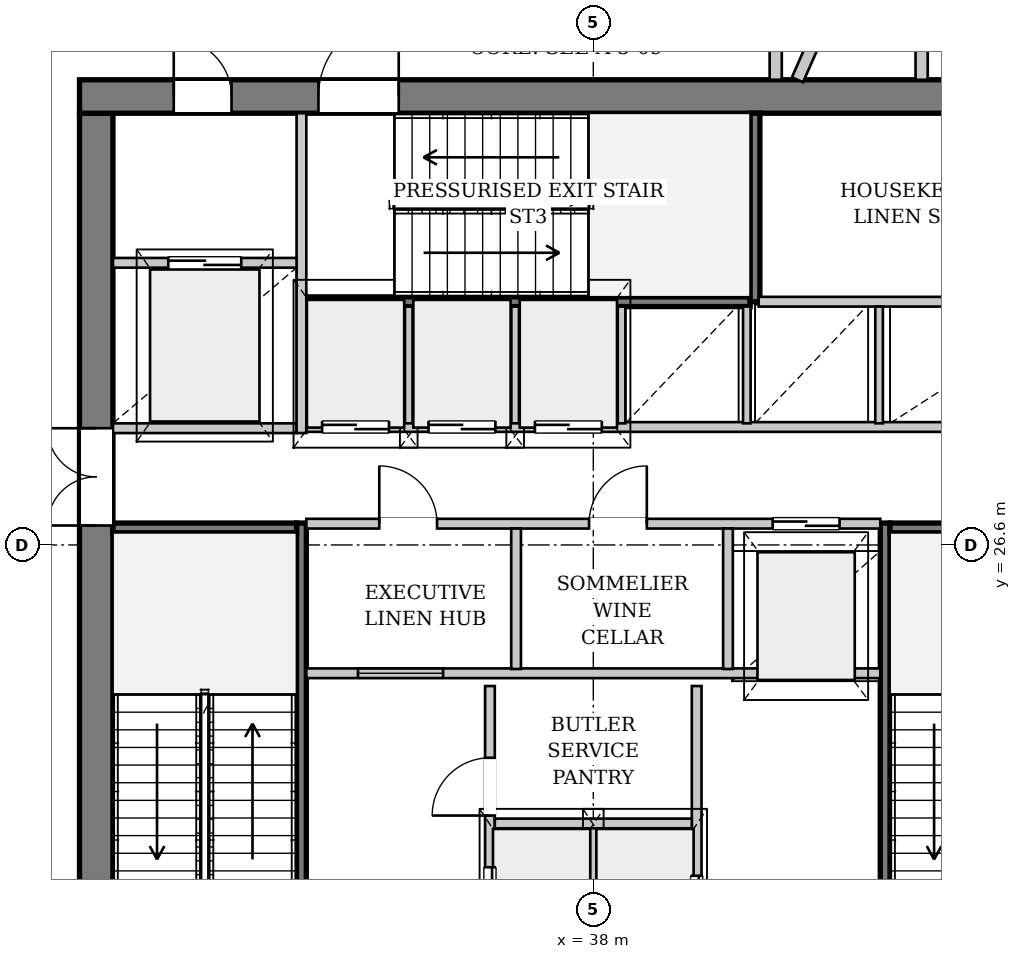
"""IFC4 building model, lengths in metres.
Left out: names, types, materials, properties, quantities, classifications, styles, units other than length and angle.
Written with IfcOpenShell. Run it as: python <this file> out.ifc"""

import sys

from ifc_helpers import new_model, si_unit, direction, frame, frame_2d, origin, place, context, subcontext, project, spatial, rectangle, extrude, source, transform, mapped, element, fill, save


model = new_model("IFC4")
c1 = context("Model", 3, precision=1e-05, world=origin(), true_north=direction((0.0, 1.0)))
c2 = subcontext(c1, "Body", "Model", "MODEL_VIEW")
j1 = project(units=[si_unit("LENGTHUNIT", "METRE"), si_unit("PLANEANGLEUNIT", "RADIAN")], contexts=[c1])
p1 = place(None, origin())
s1 = spatial("IfcSite", under=j1, at=p1, CompositionType="ELEMENT")
p2 = place(p1, origin())
s2 = spatial("IfcBuilding", under=s1, at=p2, CompositionType="ELEMENT")
p3 = place(p2, frame((0.0, 0.0, 196.3)))
s3 = spatial("IfcBuildingStorey", under=s2, at=p3, CompositionType="ELEMENT", Elevation=196.3)
p4 = place(p3, frame((16.053, 33.802, 0.0), z_axis=(0.0, 0.0, 1.0), x_axis=(0.923180319116, 0.384367140111, 0.0)))
e1 = element("IfcWall", 1, at=p4, inside=s3, PredefinedType="SOLIDWALL", context=c2, shape_type="SweptSolid", body=[
    extrude(rectangle(XDim=22.627, YDim=0.38, at=frame_2d((11.313, 0.0))), origin(), (0.0, 0.0, 1.0), 3.172),
])
p5 = place(p4, frame((5.336, 0.0, 0.252)))
e2 = element("IfcOpeningElement", 2, at=p5, cuts=e1, PredefinedType="OPENING", context=c2, shape_type="SweptSolid", body=[
    extrude(rectangle(XDim=2.0, YDim=2.8, at=frame_2d((1.0, 1.4))), frame((0.0, 0.2, 0.0), z_axis=(0.0, -1.0, 0.0), x_axis=(1.0, 0.0, 0.0)), (0.0, 0.0, 1.0), 0.4),
])
p6 = place(p4, frame((15.741, 0.0, 0.252)))
e3 = element("IfcOpeningElement", 3, at=p6, cuts=e1, PredefinedType="OPENING", context=c2, shape_type="SweptSolid", body=[
    extrude(rectangle(XDim=2.0, YDim=2.8, at=frame_2d((1.0, 1.4))), frame((0.0, 0.2, 0.0), z_axis=(0.0, -1.0, 0.0), x_axis=(1.0, 0.0, 0.0)), (0.0, 0.0, 1.0), 0.4),
])
p7 = place(p3, frame((29.825, 19.5, 0.0), z_axis=(0.0, 0.0, 1.0), x_axis=(0.0, 1.0, 0.0)))
e4 = element("IfcWall", 4, at=p7, inside=s3, PredefinedType="SHEAR", context=c2, shape_type="SweptSolid", body=[
    extrude(rectangle(XDim=14.2, YDim=0.55, at=frame_2d((7.1, 0.0))), origin(), (0.0, 0.0, 1.0), 3.78),
])
p8 = place(p7, frame((7.42, 0.0, 0.0)))
e5 = element("IfcOpeningElement", 5, at=p8, cuts=e4, PredefinedType="OPENING", context=c2, shape_type="SweptSolid", body=[
    extrude(rectangle(XDim=1.6, YDim=2.2, at=frame_2d((0.8, 1.1))), frame((0.0, 0.285, 0.0), z_axis=(0.0, -1.0, 0.0), x_axis=(1.0, 0.0, 0.0)), (0.0, 0.0, 1.0), 0.57),
])
p9 = place(p3, frame((29.55, 33.975, 0.0), z_axis=(0.0, 0.0, 1.0), x_axis=(1.0, 0.0, 0.0)))
e6 = element("IfcWall", 6, at=p9, inside=s3, PredefinedType="SHEAR", context=c2, shape_type="SweptSolid", body=[
    extrude(rectangle(XDim=16.9, YDim=0.55, at=frame_2d((8.45, 0.0))), origin(), (0.0, 0.0, 1.0), 3.78),
])
p10 = place(p9, frame((1.55, 0.0, 0.0)))
e7 = element("IfcOpeningElement", 7, at=p10, cuts=e6, PredefinedType="OPENING", context=c2, shape_type="SweptSolid", body=[
    extrude(rectangle(XDim=0.95, YDim=2.1, at=frame_2d((0.475, 1.05))), frame((0.0, 0.285, 0.0), z_axis=(0.0, -1.0, 0.0), x_axis=(1.0, 0.0, 0.0)), (0.0, 0.0, 1.0), 0.57),
])
p11 = place(p9, frame((3.93, 0.0, 0.0)))
e8 = element("IfcOpeningElement", 8, at=p11, cuts=e6, PredefinedType="OPENING", context=c2, shape_type="SweptSolid", body=[
    extrude(rectangle(XDim=1.32, YDim=2.2, at=frame_2d((0.66, 1.1))), frame((0.0, 0.285, 0.0), z_axis=(0.0, -1.0, 0.0), x_axis=(1.0, 0.0, 0.0)), (0.0, 0.0, 1.0), 0.57),
])
p12 = place(p3, frame((33.2, 19.5, 0.0), z_axis=(0.0, 0.0, 1.0), x_axis=(0.0, 1.0, 0.0)))
e9 = element("IfcWall", 9, at=p12, inside=s3, PredefinedType="PARTITIONING", context=c2, shape_type="SweptSolid", body=[
    extrude(rectangle(XDim=7.46, YDim=0.16, at=frame_2d((3.73, 0.0))), origin(), (0.0, 0.0, 1.0), 3.78),
])
p13 = place(p12, frame((0.08, 0.0, 0.0)))
e10 = element("IfcOpeningElement", 10, at=p13, cuts=e9, PredefinedType="OPENING", context=c2, shape_type="SweptSolid", body=[
    extrude(rectangle(XDim=1.32, YDim=2.2, at=frame_2d((0.66, 1.1))), frame((0.0, 0.09, 0.0), z_axis=(0.0, -1.0, 0.0), x_axis=(1.0, 0.0, 0.0)), (0.0, 0.0, 1.0), 0.18),
])
p14 = place(p3, frame((30.1, 26.88, 0.0), z_axis=(0.0, 0.0, 1.0), x_axis=(1.0, 0.0, 0.0)))
e11 = element("IfcWall", 11, at=p14, inside=s3, PredefinedType="PARTITIONING", context=c2, shape_type="SweptSolid", body=[
    extrude(rectangle(XDim=3.02, YDim=0.16, at=frame_2d((1.51, 0.0))), origin(), (0.0, 0.0, 1.0), 3.78),
])
p15 = place(p3, frame((42.8, 26.96, 0.0), z_axis=(0.0, 0.0, 1.0), x_axis=(0.0, -1.0, 0.0)))
e12 = element("IfcWall", 12, at=p15, inside=s3, PredefinedType="PARTITIONING", context=c2, shape_type="SweptSolid", body=[
    extrude(rectangle(XDim=7.46, YDim=0.16, at=frame_2d((3.73, 0.0))), origin(), (0.0, 0.0, 1.0), 3.78),
])
p16 = place(p15, frame((6.06, 0.0, 0.0)))
e13 = element("IfcOpeningElement", 13, at=p16, cuts=e12, PredefinedType="OPENING", context=c2, shape_type="SweptSolid", body=[
    extrude(rectangle(XDim=1.32, YDim=2.2, at=frame_2d((0.66, 1.1))), frame((0.0, 0.09, 0.0), z_axis=(0.0, -1.0, 0.0), x_axis=(1.0, 0.0, 0.0)), (0.0, 0.0, 1.0), 0.18),
])
p17 = place(p3, frame((42.88, 26.88, 0.0), z_axis=(0.0, 0.0, 1.0), x_axis=(1.0, 0.0, 0.0)))
e14 = element("IfcWall", 14, at=p17, inside=s3, PredefinedType="PARTITIONING", context=c2, shape_type="SweptSolid", body=[
    extrude(rectangle(XDim=3.02, YDim=0.16, at=frame_2d((1.51, 0.0))), origin(), (0.0, 0.0, 1.0), 3.78),
])
p18 = place(p3, frame((33.28, 30.6, 0.0), z_axis=(0.0, 0.0, 1.0), x_axis=(1.0, 0.0, 0.0)))
e15 = element("IfcWall", 15, at=p18, inside=s3, PredefinedType="PARTITIONING", context=c2, shape_type="SweptSolid", body=[
    extrude(rectangle(XDim=7.3, YDim=0.16, at=frame_2d((3.65, 0.0))), origin(), (0.0, 0.0, 1.0), 3.78),
])
p19 = place(p3, frame((40.66, 30.6, 0.0), z_axis=(0.0, 0.0, 1.0), x_axis=(0.0, 1.0, 0.0)))
e16 = element("IfcWall", 16, at=p19, inside=s3, PredefinedType="PARTITIONING", context=c2, shape_type="SweptSolid", body=[
    extrude(rectangle(XDim=3.1, YDim=0.16, at=frame_2d((1.55, 0.0))), origin(), (0.0, 0.0, 1.0), 3.78),
])
p20 = place(p3, frame((36.3, 19.5, 0.0), z_axis=(0.0, 0.0, 1.0), x_axis=(0.0, 1.0, 0.0)))
e17 = element("IfcWall", 17, at=p20, inside=s3, PredefinedType="PARTITIONING", context=c2, shape_type="SweptSolid", body=[
    extrude(rectangle(XDim=4.78, YDim=0.16, at=frame_2d((2.39, 0.0))), origin(), (0.0, 0.0, 1.0), 3.78),
])
p21 = place(p20, frame((0.6, 0.0, 0.0)))
e18 = element("IfcOpeningElement", 18, at=p21, cuts=e17, PredefinedType="OPENING", context=c2, shape_type="SweptSolid", body=[
    extrude(rectangle(XDim=1.2, YDim=2.2, at=frame_2d((0.6, 1.1))), frame((0.0, 0.09, 0.0), z_axis=(0.0, -1.0, 0.0), x_axis=(1.0, 0.0, 0.0)), (0.0, 0.0, 1.0), 0.18),
])
p22 = place(p20, frame((2.65, 0.0, 0.0)))
e19 = element("IfcOpeningElement", 19, at=p22, cuts=e17, PredefinedType="OPENING", context=c2, shape_type="SweptSolid", body=[
    extrude(rectangle(XDim=0.95, YDim=2.1, at=frame_2d((0.475, 1.05))), frame((0.0, 0.09, 0.0), z_axis=(0.0, -1.0, 0.0), x_axis=(1.0, 0.0, 0.0)), (0.0, 0.0, 1.0), 0.18),
])
p23 = place(p3, frame((39.7, 24.28, 0.0), z_axis=(0.0, 0.0, 1.0), x_axis=(0.0, -1.0, 0.0)))
e20 = element("IfcWall", 20, at=p23, inside=s3, PredefinedType="PARTITIONING", context=c2, shape_type="SweptSolid", body=[
    extrude(rectangle(XDim=4.78, YDim=0.16, at=frame_2d((2.39, 0.0))), origin(), (0.0, 0.0, 1.0), 3.78),
])
p24 = place(p23, frame((3.12, 0.0, 0.0)))
e21 = element("IfcOpeningElement", 21, at=p24, cuts=e20, PredefinedType="OPENING", context=c2, shape_type="SweptSolid", body=[
    extrude(rectangle(XDim=1.2, YDim=2.2, at=frame_2d((0.6, 1.1))), frame((0.0, 0.09, 0.0), z_axis=(0.0, -1.0, 0.0), x_axis=(1.0, 0.0, 0.0)), (0.0, 0.0, 1.0), 0.18),
])
p25 = place(p3, frame((38.0, 19.5, 0.0), z_axis=(0.0, 0.0, 1.0), x_axis=(0.0, 1.0, 0.0)))
e22 = element("IfcWall", 22, at=p25, inside=s3, PredefinedType="PARTITIONING", context=c2, shape_type="SweptSolid", body=[
    extrude(rectangle(XDim=2.46, YDim=0.125, at=frame_2d((1.23, 0.0))), origin(), (0.0, 0.0, 1.0), 3.78),
])
p26 = place(p3, frame((36.38, 22.02, 0.0), z_axis=(0.0, 0.0, 1.0), x_axis=(1.0, 0.0, 0.0)))
e23 = element("IfcWall", 23, at=p26, inside=s3, PredefinedType="PARTITIONING", context=c2, shape_type="SweptSolid", body=[
    extrude(rectangle(XDim=3.24, YDim=0.16, at=frame_2d((1.62, 0.0))), origin(), (0.0, 0.0, 1.0), 3.78),
])
p27 = place(p3, frame((33.28, 24.49, 0.0), z_axis=(0.0, 0.0, 1.0), x_axis=(1.0, 0.0, 0.0)))
e24 = element("IfcWall", 24, at=p27, inside=s3, PredefinedType="PARTITIONING", context=c2, shape_type="SweptSolid", body=[
    extrude(rectangle(XDim=9.44, YDim=0.16, at=frame_2d((4.72, 0.0))), origin(), (0.0, 0.0, 1.0), 3.78),
])
p28 = place(p27, frame((0.85, 0.0, 0.95)))
e25 = element("IfcOpeningElement", 25, at=p28, cuts=e24, PredefinedType="OPENING", context=c2, shape_type="SweptSolid", body=[
    extrude(rectangle(XDim=1.4, YDim=1.8, at=frame_2d((0.7, 0.9))), frame((0.0, 0.09, 0.0), z_axis=(0.0, -1.0, 0.0), x_axis=(1.0, 0.0, 0.0)), (0.0, 0.0, 1.0), 0.18),
])
p29 = place(p3, frame((30.1, 28.52, 0.0), z_axis=(0.0, 0.0, 1.0), x_axis=(1.0, 0.0, 0.0)))
e26 = element("IfcWall", 26, at=p29, inside=s3, PredefinedType="PARTITIONING", context=c2, shape_type="SweptSolid", body=[
    extrude(rectangle(XDim=3.02, YDim=0.16, at=frame_2d((1.51, 0.0))), origin(), (0.0, 0.0, 1.0), 3.78),
])
p30 = place(p3, frame((33.2, 28.44, 0.0), z_axis=(0.0, 0.0, 1.0), x_axis=(0.0, 1.0, 0.0)))
e27 = element("IfcWall", 27, at=p30, inside=s3, PredefinedType="PARTITIONING", context=c2, shape_type="SweptSolid", body=[
    extrude(rectangle(XDim=5.26, YDim=0.16, at=frame_2d((2.63, 0.0))), origin(), (0.0, 0.0, 1.0), 3.78),
])
p31 = place(p3, frame((30.1, 31.24, 0.0), z_axis=(0.0, 0.0, 1.0), x_axis=(1.0, 0.0, 0.0)))
e28 = element("IfcWall", 28, at=p31, inside=s3, PredefinedType="PARTITIONING", context=c2, shape_type="SweptSolid", body=[
    extrude(rectangle(XDim=3.02, YDim=0.16, at=frame_2d((1.51, 0.0))), origin(), (0.0, 0.0, 1.0), 3.78),
])
p32 = place(p31, frame((0.91, 0.0, 0.0)))
e29 = element("IfcOpeningElement", 29, at=p32, cuts=e28, PredefinedType="OPENING", context=c2, shape_type="SweptSolid", body=[
    extrude(rectangle(XDim=1.2, YDim=2.2, at=frame_2d((0.6, 1.1))), frame((0.0, 0.09, 0.0), z_axis=(0.0, -1.0, 0.0), x_axis=(1.0, 0.0, 0.0)), (0.0, 0.0, 1.0), 0.18),
])
p33 = place(p3, frame((33.28, 26.95, 0.0), z_axis=(0.0, 0.0, 1.0), x_axis=(1.0, 0.0, 0.0)))
e30 = element("IfcWall", 30, at=p33, inside=s3, PredefinedType="PARTITIONING", context=c2, shape_type="SweptSolid", body=[
    extrude(rectangle(XDim=9.44, YDim=0.16, at=frame_2d((4.72, 0.0))), origin(), (0.0, 0.0, 1.0), 3.78),
])
p34 = place(p33, frame((1.2, 0.0, 0.0)))
e31 = element("IfcOpeningElement", 31, at=p34, cuts=e30, PredefinedType="OPENING", context=c2, shape_type="SweptSolid", body=[
    extrude(rectangle(XDim=0.95, YDim=2.1, at=frame_2d((0.475, 1.05))), frame((0.0, 0.09, 0.0), z_axis=(0.0, -1.0, 0.0), x_axis=(1.0, 0.0, 0.0)), (0.0, 0.0, 1.0), 0.18),
])
p35 = place(p33, frame((4.65, 0.0, 0.0)))
e32 = element("IfcOpeningElement", 32, at=p35, cuts=e30, PredefinedType="OPENING", context=c2, shape_type="SweptSolid", body=[
    extrude(rectangle(XDim=0.95, YDim=2.1, at=frame_2d((0.475, 1.05))), frame((0.0, 0.09, 0.0), z_axis=(0.0, -1.0, 0.0), x_axis=(1.0, 0.0, 0.0)), (0.0, 0.0, 1.0), 0.18),
])
p36 = place(p33, frame((7.67, 0.0, 0.0)))
e33 = element("IfcOpeningElement", 33, at=p36, cuts=e30, PredefinedType="OPENING", context=c2, shape_type="SweptSolid", body=[
    extrude(rectangle(XDim=1.1, YDim=2.2, at=frame_2d((0.55, 1.1))), frame((0.0, 0.09, 0.0), z_axis=(0.0, -1.0, 0.0), x_axis=(1.0, 0.0, 0.0)), (0.0, 0.0, 1.0), 0.18),
])
for number, where, z_axis, x_axis in (
    (34, (36.73, 24.56, 0.0), (0.0, 0.0, 1.0), (0.0, 1.0, 0.0)),
    (35, (40.215, 24.56, 0.0), (0.0, 0.0, 1.0), (0.0, 1.0, 0.0)),
):
    element("IfcWall", number, at=place(p3, frame(where, z_axis=z_axis, x_axis=x_axis)), inside=s3, PredefinedType="PARTITIONING", context=c2, shape_type="SweptSolid", body=[
        extrude(rectangle(XDim=2.31, YDim=0.16, at=frame_2d((1.155, 0.0))), origin(), (0.0, 0.0, 1.0), 3.78),
    ])
p37 = place(p3, frame((33.28, 28.54, 0.0), z_axis=(0.0, 0.0, 1.0), x_axis=(1.0, 0.0, 0.0)))
e36 = element("IfcWall", 36, at=p37, inside=s3, PredefinedType="PARTITIONING", context=c2, shape_type="SweptSolid", body=[
    extrude(rectangle(XDim=12.62, YDim=0.16, at=frame_2d((6.31, 0.0))), origin(), (0.0, 0.0, 1.0), 3.78),
])
p38 = place(p37, frame((0.26, 0.0, 0.0)))
e37 = element("IfcOpeningElement", 37, at=p38, cuts=e36, PredefinedType="OPENING", context=c2, shape_type="SweptSolid", body=[
    extrude(rectangle(XDim=1.1, YDim=2.2, at=frame_2d((0.55, 1.1))), frame((0.0, 0.09, 0.0), z_axis=(0.0, -1.0, 0.0), x_axis=(1.0, 0.0, 0.0)), (0.0, 0.0, 1.0), 0.18),
])
p39 = place(p37, frame((2.01, 0.0, 0.0)))
e38 = element("IfcOpeningElement", 38, at=p39, cuts=e36, PredefinedType="OPENING", context=c2, shape_type="SweptSolid", body=[
    extrude(rectangle(XDim=1.1, YDim=2.2, at=frame_2d((0.55, 1.1))), frame((0.0, 0.09, 0.0), z_axis=(0.0, -1.0, 0.0), x_axis=(1.0, 0.0, 0.0)), (0.0, 0.0, 1.0), 0.18),
])
p40 = place(p37, frame((3.76, 0.0, 0.0)))
e39 = element("IfcOpeningElement", 39, at=p40, cuts=e36, PredefinedType="OPENING", context=c2, shape_type="SweptSolid", body=[
    extrude(rectangle(XDim=1.1, YDim=2.2, at=frame_2d((0.55, 1.1))), frame((0.0, 0.09, 0.0), z_axis=(0.0, -1.0, 0.0), x_axis=(1.0, 0.0, 0.0)), (0.0, 0.0, 1.0), 0.18),
])
p41 = place(p3, frame((40.72, 30.6, 0.0), z_axis=(0.0, 0.0, 1.0), x_axis=(1.0, 0.0, 0.0)))
e40 = element("IfcWall", 40, at=p41, inside=s3, PredefinedType="PARTITIONING", context=c2, shape_type="SweptSolid", body=[
    extrude(rectangle(XDim=5.18, YDim=0.16, at=frame_2d((2.59, 0.0))), origin(), (0.0, 0.0, 1.0), 3.78),
])
for number, where, z_axis, x_axis in (
    (41, (34.965, 28.6, 0.0), (0.0, 0.0, 1.0), (0.0, 1.0, 0.0)),
    (42, (36.715, 28.6, 0.0), (0.0, 0.0, 1.0), (0.0, 1.0, 0.0)),
    (43, (38.465, 28.6, 0.0), (0.0, 0.0, 1.0), (0.0, 1.0, 0.0)),
    (44, (40.525, 28.6, 0.0), (0.0, 0.0, 1.0), (0.0, 1.0, 0.0)),
    (45, (42.7, 28.6, 0.0), (0.0, 0.0, 1.0), (0.0, 1.0, 0.0)),
):
    element("IfcWall", number, at=place(p3, frame(where, z_axis=z_axis, x_axis=x_axis)), inside=s3, PredefinedType="PARTITIONING", context=c2, shape_type="SweptSolid", body=[
        extrude(rectangle(XDim=1.92, YDim=0.125, at=frame_2d((0.96, 0.0))), origin(), (0.0, 0.0, 1.0), 3.78),
    ])
p42 = place(p3, frame((41.358, 34.25, 0.0), z_axis=(0.0, 0.0, 1.0), x_axis=(0.401937727642, 0.915667004483, 0.0)))
e46 = element("IfcWall", 46, at=p42, inside=s3, PredefinedType="PARTITIONING", context=c2, shape_type="SweptSolid", body=[
    extrude(rectangle(XDim=10.78, YDim=0.2, at=frame_2d((5.39, 0.0))), origin(), (0.0, 0.0, 1.0), 3.78),
])
for number, where, z_axis, x_axis in (
    (47, (41.0, 34.25, 0.0), (0.0, 0.0, 1.0), (0.0, 1.0, 0.0)),
    (48, (43.4, 34.25, 0.0), (0.0, 0.0, 1.0), (0.0, 1.0, 0.0)),
):
    element("IfcWall", number, at=place(p3, frame(where, z_axis=z_axis, x_axis=x_axis)), inside=s3, PredefinedType="PARTITIONING", context=c2, shape_type="SweptSolid", body=[
        extrude(rectangle(XDim=1.95, YDim=0.2, at=frame_2d((0.975, 0.0))), origin(), (0.0, 0.0, 1.0), 3.78),
    ])
m1 = source(origin(), c2, "Body", "SweptSolid", [
    extrude(rectangle(XDim=1.6, YDim=2.2, at=frame_2d((0.8, 1.1))), frame((0.0, 0.025, 0.0), z_axis=(0.0, -1.0, 0.0), x_axis=(1.0, 0.0, 0.0)), (0.0, 0.0, 1.0), 0.05),
])
p43 = place(p8, origin())
e49 = element("IfcDoor", 49, at=p43, inside=s3, OperationType="DOUBLE_DOOR_SINGLE_SWING", PredefinedType="DOOR", context=c2, shape_type="MappedRepresentation", body=[
    mapped(m1, transform((0.0, 0.0, 0.0), x_axis=(1.0, 0.0, 0.0), y_axis=(0.0, 1.0, 0.0), z_axis=(0.0, 0.0, 1.0), scale=1.0)),
])
fill(e5, e49)
m2 = source(origin(), c2, "Body", "SweptSolid", [
    extrude(rectangle(XDim=0.95, YDim=2.1, at=frame_2d((0.475, 1.05))), frame((0.0, 0.025, 0.0), z_axis=(0.0, -1.0, 0.0), x_axis=(1.0, 0.0, 0.0)), (0.0, 0.0, 1.0), 0.05),
])
p44 = place(p10, origin())
e50 = element("IfcDoor", 50, at=p44, inside=s3, OperationType="SINGLE_SWING_LEFT", PredefinedType="DOOR", context=c2, shape_type="MappedRepresentation", body=[
    mapped(m2, transform((0.0, 0.0, 0.0), x_axis=(1.0, 0.0, 0.0), y_axis=(0.0, 1.0, 0.0), z_axis=(0.0, 0.0, 1.0), scale=1.0)),
])
fill(e7, e50)
m3 = source(origin(), c2, "Body", "SweptSolid", [
    extrude(rectangle(XDim=1.32, YDim=2.2, at=frame_2d((0.66, 1.1))), frame((0.0, 0.025, 0.0), z_axis=(0.0, -1.0, 0.0), x_axis=(1.0, 0.0, 0.0)), (0.0, 0.0, 1.0), 0.05),
])
p45 = place(p11, origin())
e51 = element("IfcDoor", 51, at=p45, inside=s3, OperationType="SINGLE_SWING_RIGHT", PredefinedType="DOOR", context=c2, shape_type="MappedRepresentation", body=[
    mapped(m3, transform((0.0, 0.0, 0.0), x_axis=(1.0, 0.0, 0.0), y_axis=(0.0, 1.0, 0.0), z_axis=(0.0, 0.0, 1.0), scale=1.0)),
])
fill(e8, e51)
m4 = source(origin(), c2, "Body", "SweptSolid", [
    extrude(rectangle(XDim=1.2, YDim=2.2, at=frame_2d((0.6, 1.1))), frame((0.0, 0.025, 0.0), z_axis=(0.0, -1.0, 0.0), x_axis=(1.0, 0.0, 0.0)), (0.0, 0.0, 1.0), 0.05),
])
p46 = place(p21, origin())
e52 = element("IfcDoor", 52, at=p46, inside=s3, OperationType="DOUBLE_DOOR_SLIDING", PredefinedType="DOOR", context=c2, shape_type="MappedRepresentation", body=[
    mapped(m4, transform((0.0, 0.0, 0.0), x_axis=(1.0, 0.0, 0.0), y_axis=(0.0, 1.0, 0.0), z_axis=(0.0, 0.0, 1.0), scale=1.0)),
])
fill(e18, e52)
p47 = place(p22, origin())
e53 = element("IfcDoor", 53, at=p47, inside=s3, OperationType="SINGLE_SWING_LEFT", PredefinedType="DOOR", context=c2, shape_type="MappedRepresentation", body=[
    mapped(m2, transform((0.0, 0.0, 0.0), x_axis=(1.0, 0.0, 0.0), y_axis=(0.0, 1.0, 0.0), z_axis=(0.0, 0.0, 1.0), scale=1.0)),
])
fill(e19, e53)
p48 = place(p24, origin())
e54 = element("IfcDoor", 54, at=p48, inside=s3, OperationType="DOUBLE_DOOR_SLIDING", PredefinedType="DOOR", context=c2, shape_type="MappedRepresentation", body=[
    mapped(m4, transform((0.0, 0.0, 0.0), x_axis=(1.0, 0.0, 0.0), y_axis=(0.0, 1.0, 0.0), z_axis=(0.0, 0.0, 1.0), scale=1.0)),
])
fill(e21, e54)
p49 = place(p32, origin())
e55 = element("IfcDoor", 55, at=p49, inside=s3, OperationType="DOUBLE_DOOR_SLIDING", PredefinedType="DOOR", context=c2, shape_type="MappedRepresentation", body=[
    mapped(m4, transform((0.0, 0.0, 0.0), x_axis=(1.0, 0.0, 0.0), y_axis=(0.0, 1.0, 0.0), z_axis=(0.0, 0.0, 1.0), scale=1.0)),
])
fill(e29, e55)
p50 = place(p34, origin())
e56 = element("IfcDoor", 56, at=p50, inside=s3, OperationType="SINGLE_SWING_LEFT", PredefinedType="DOOR", context=c2, shape_type="MappedRepresentation", body=[
    mapped(m2, transform((0.0, 0.0, 0.0), x_axis=(1.0, 0.0, 0.0), y_axis=(0.0, 1.0, 0.0), z_axis=(0.0, 0.0, 1.0), scale=1.0)),
])
fill(e31, e56)
p51 = place(p35, origin())
e57 = element("IfcDoor", 57, at=p51, inside=s3, OperationType="SINGLE_SWING_RIGHT", PredefinedType="DOOR", context=c2, shape_type="MappedRepresentation", body=[
    mapped(m2, transform((0.0, 0.0, 0.0), x_axis=(1.0, 0.0, 0.0), y_axis=(0.0, 1.0, 0.0), z_axis=(0.0, 0.0, 1.0), scale=1.0)),
])
fill(e32, e57)
m5 = source(origin(), c2, "Body", "SweptSolid", [
    extrude(rectangle(XDim=1.1, YDim=2.2, at=frame_2d((0.55, 1.1))), frame((0.0, 0.025, 0.0), z_axis=(0.0, -1.0, 0.0), x_axis=(1.0, 0.0, 0.0)), (0.0, 0.0, 1.0), 0.05),
])
p52 = place(p36, origin())
e58 = element("IfcDoor", 58, at=p52, inside=s3, OperationType="DOUBLE_DOOR_SLIDING", PredefinedType="DOOR", context=c2, shape_type="MappedRepresentation", body=[
    mapped(m5, transform((0.0, 0.0, 0.0), x_axis=(1.0, 0.0, 0.0), y_axis=(0.0, 1.0, 0.0), z_axis=(0.0, 0.0, 1.0), scale=1.0)),
])
fill(e33, e58)
p53 = place(p38, origin())
e59 = element("IfcDoor", 59, at=p53, inside=s3, OperationType="DOUBLE_DOOR_SLIDING", PredefinedType="DOOR", context=c2, shape_type="MappedRepresentation", body=[
    mapped(m5, transform((0.0, 0.0, 0.0), x_axis=(1.0, 0.0, 0.0), y_axis=(0.0, 1.0, 0.0), z_axis=(0.0, 0.0, 1.0), scale=1.0)),
])
fill(e37, e59)
p54 = place(p39, origin())
e60 = element("IfcDoor", 60, at=p54, inside=s3, OperationType="DOUBLE_DOOR_SLIDING", PredefinedType="DOOR", context=c2, shape_type="MappedRepresentation", body=[
    mapped(m5, transform((0.0, 0.0, 0.0), x_axis=(1.0, 0.0, 0.0), y_axis=(0.0, 1.0, 0.0), z_axis=(0.0, 0.0, 1.0), scale=1.0)),
])
fill(e38, e60)
p55 = place(p40, origin())
e61 = element("IfcDoor", 61, at=p55, inside=s3, OperationType="DOUBLE_DOOR_SLIDING", PredefinedType="DOOR", context=c2, shape_type="MappedRepresentation", body=[
    mapped(m5, transform((0.0, 0.0, 0.0), x_axis=(1.0, 0.0, 0.0), y_axis=(0.0, 1.0, 0.0), z_axis=(0.0, 0.0, 1.0), scale=1.0)),
])
fill(e39, e61)
m6 = source(origin(), c2, "Body", "SweptSolid", [
    extrude(rectangle(XDim=1.4, YDim=1.8, at=frame_2d((0.7, 0.9))), frame((0.0, 0.03, 0.0), z_axis=(0.0, -1.0, 0.0), x_axis=(1.0, 0.0, 0.0)), (0.0, 0.0, 1.0), 0.06),
])
p56 = place(p28, origin())
e62 = element("IfcWindow", 62, at=p56, inside=s3, PartitioningType="SINGLE_PANEL", PredefinedType="WINDOW", context=c2, shape_type="MappedRepresentation", body=[
    mapped(m6, transform((0.0, 0.0, 0.0), x_axis=(1.0, 0.0, 0.0), y_axis=(0.0, 1.0, 0.0), z_axis=(0.0, 0.0, 1.0), scale=1.0)),
])
fill(e25, e62)
save(model, sys.argv[1])
